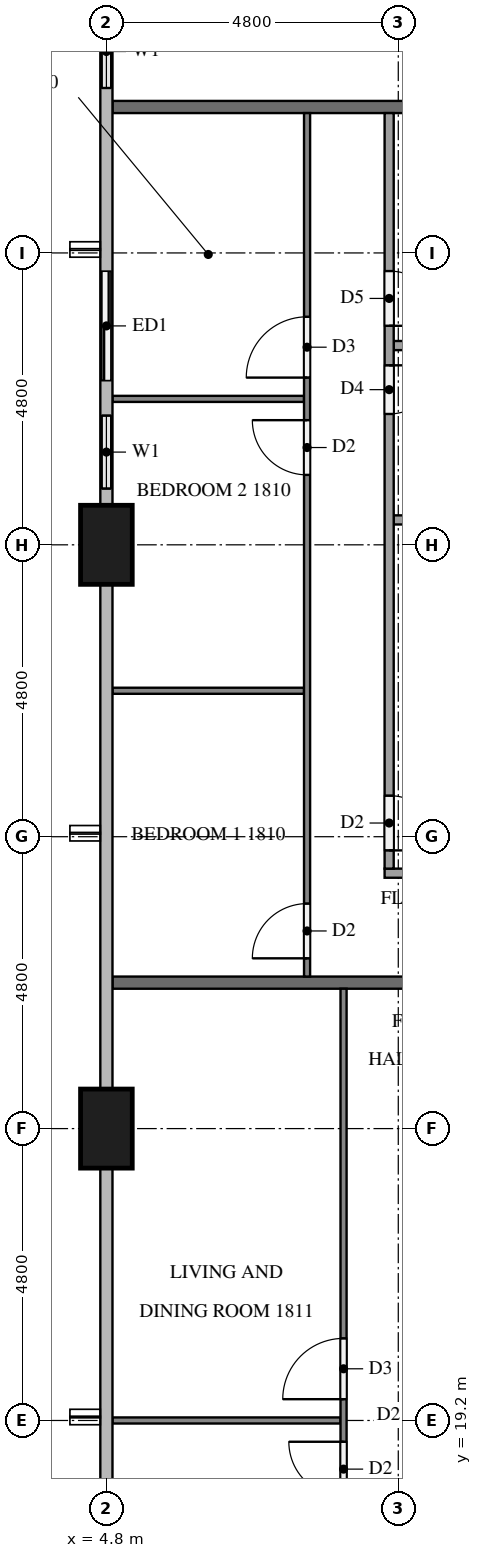
"""IFC4 building model, lengths in metres.
Left out: names, types, materials, properties, quantities, classifications, styles, units other than length and angle.
Written with IfcOpenShell. Run it as: python <this file> out.ifc"""

import sys

from ifc_helpers import new_model, si_unit, direction, frame, frame_2d, origin, origin_2d, place, context, subcontext, project, spatial, rectangle, extrude, element, fill, save


model = new_model("IFC4")
c1 = context("Model", 3, precision=1e-05, world=origin(), true_north=direction((0.0, 1.0)))
c2 = subcontext(c1, "Body", "Model", "MODEL_VIEW")
j1 = project(units=[si_unit("LENGTHUNIT", "METRE"), si_unit("PLANEANGLEUNIT", "RADIAN")], contexts=[c1])
p1 = place(None, origin())
s1 = spatial("IfcSite", under=j1, at=p1, CompositionType="ELEMENT")
p2 = place(p1, origin())
s2 = spatial("IfcBuilding", under=s1, at=p2, CompositionType="ELEMENT")
p3 = place(p2, frame((0.0, 0.0, 73.3)))
s3 = spatial("IfcBuildingStorey", under=s2, at=p3, CompositionType="ELEMENT", Elevation=73.3)
for number, where, z_axis, x_axis in (
    (1, (4.8, 33.6, 0.0), (0.0, 0.0, 1.0), (0.0, 1.0, 0.0)),
    (2, (4.8, 24.0, 0.0), (0.0, 0.0, 1.0), (0.0, 1.0, 0.0)),
):
    element("IfcColumn", number, at=place(p3, frame(where, z_axis=z_axis, x_axis=x_axis)), inside=s3, PredefinedType="COLUMN", context=c2, shape_type="SweptSolid", body=[
        extrude(rectangle(XDim=1.3, YDim=0.85, at=origin_2d()), origin(), (0.0, 0.0, 1.0), 3.2),
    ])
p4 = place(p3, frame((4.8, 42.625, 0.0), z_axis=(0.0, 0.0, 1.0), x_axis=(0.0, -1.0, 0.0)))
e3 = element("IfcWall", 3, at=p4, inside=s3, PredefinedType="SOLIDWALL", context=c2, shape_type="SweptSolid", body=[
    extrude(rectangle(XDim=1.825, YDim=0.15, at=frame_2d((0.913, 0.0))), origin(), (0.0, 0.0, 1.0), 3.2),
])
p5 = place(p4, frame((0.312, 0.0, 0.9)))
e4 = element("IfcOpeningElement", 4, at=p5, cuts=e3, PredefinedType="OPENING", context=c2, shape_type="SweptSolid", body=[
    extrude(rectangle(XDim=1.2, YDim=1.4, at=frame_2d((0.6, 0.7))), frame((0.0, 0.085, 0.0), z_axis=(0.0, -1.0, 0.0), x_axis=(1.0, 0.0, 0.0)), (0.0, 0.0, 1.0), 0.17),
])
p6 = place(p3, frame((4.8, 38.4, 0.0), z_axis=(0.0, 0.0, 1.0), x_axis=(0.0, -1.0, 0.0)))
e5 = element("IfcWall", 5, at=p6, inside=s3, PredefinedType="SOLIDWALL", context=c2, shape_type="SweptSolid", body=[
    extrude(rectangle(XDim=4.15, YDim=0.15, at=frame_2d((2.075, 0.0))), origin(), (0.0, 0.0, 1.0), 3.2),
])
p7 = place(p6, frame((0.3, 0.0, 0.0)))
e6 = element("IfcOpeningElement", 6, at=p7, cuts=e5, PredefinedType="OPENING", context=c2, shape_type="SweptSolid", body=[
    extrude(rectangle(XDim=1.8, YDim=2.4, at=frame_2d((0.9, 1.2))), frame((0.0, 0.085, 0.0), z_axis=(0.0, -1.0, 0.0), x_axis=(1.0, 0.0, 0.0)), (0.0, 0.0, 1.0), 0.17),
])
p8 = place(p6, frame((2.675, 0.0, 0.9)))
e7 = element("IfcOpeningElement", 7, at=p8, cuts=e5, PredefinedType="OPENING", context=c2, shape_type="SweptSolid", body=[
    extrude(rectangle(XDim=1.2, YDim=1.4, at=frame_2d((0.6, 0.7))), frame((0.0, 0.085, 0.0), z_axis=(0.0, -1.0, 0.0), x_axis=(1.0, 0.0, 0.0)), (0.0, 0.0, 1.0), 0.17),
])
for number, where, z_axis, x_axis in (
    (8, (4.9, 40.8, 0.0), (0.0, 0.0, 1.0), (1.0, 0.0, 0.0)),
    (9, (4.9, 26.4, 0.0), (0.0, 0.0, 1.0), (1.0, 0.0, 0.0)),
):
    element("IfcWall", number, at=place(p3, frame(where, z_axis=z_axis, x_axis=x_axis)), inside=s3, PredefinedType="PARTITIONING", context=c2, shape_type="SweptSolid", body=[
        extrude(rectangle(XDim=7.0, YDim=0.2, at=frame_2d((3.5, 0.0))), origin(), (0.0, 0.0, 1.0), 3.2),
    ])
for number, where, z_axis, x_axis in (
    (10, (8.05, 31.2, 0.0), (0.0, 0.0, 1.0), (-1.0, 0.0, 0.0)),
    (11, (8.05, 36.0, 0.0), (0.0, 0.0, 1.0), (-1.0, 0.0, 0.0)),
):
    element("IfcWall", number, at=place(p3, frame(where, z_axis=z_axis, x_axis=x_axis)), inside=s3, PredefinedType="PARTITIONING", context=c2, shape_type="SweptSolid", body=[
        extrude(rectangle(XDim=3.15, YDim=0.1, at=frame_2d((1.575, 0.0))), origin(), (0.0, 0.0, 1.0), 3.2),
    ])
p9 = place(p3, frame((8.1, 26.5, 0.0), z_axis=(0.0, 0.0, 1.0), x_axis=(0.0, 1.0, 0.0)))
e12 = element("IfcWall", 12, at=p9, inside=s3, PredefinedType="PARTITIONING", context=c2, shape_type="SweptSolid", body=[
    extrude(rectangle(XDim=14.2, YDim=0.1, at=frame_2d((7.1, 0.0))), origin(), (0.0, 0.0, 1.0), 3.2),
])
p10 = place(p9, frame((0.3, 0.0, 0.0)))
e13 = element("IfcOpeningElement", 13, at=p10, cuts=e12, PredefinedType="OPENING", context=c2, shape_type="SweptSolid", body=[
    extrude(rectangle(XDim=0.9, YDim=2.1, at=frame_2d((0.45, 1.05))), frame((0.0, 0.06, 0.0), z_axis=(0.0, -1.0, 0.0), x_axis=(1.0, 0.0, 0.0)), (0.0, 0.0, 1.0), 0.12),
])
p11 = place(p9, frame((8.25, 0.0, 0.0)))
e14 = element("IfcOpeningElement", 14, at=p11, cuts=e12, PredefinedType="OPENING", context=c2, shape_type="SweptSolid", body=[
    extrude(rectangle(XDim=0.9, YDim=2.1, at=frame_2d((0.45, 1.05))), frame((0.0, 0.06, 0.0), z_axis=(0.0, -1.0, 0.0), x_axis=(1.0, 0.0, 0.0)), (0.0, 0.0, 1.0), 0.12),
])
p12 = place(p9, frame((9.85, 0.0, 0.0)))
e15 = element("IfcOpeningElement", 15, at=p12, cuts=e12, PredefinedType="OPENING", context=c2, shape_type="SweptSolid", body=[
    extrude(rectangle(XDim=1.0, YDim=2.1, at=frame_2d((0.5, 1.05))), frame((0.0, 0.06, 0.0), z_axis=(0.0, -1.0, 0.0), x_axis=(1.0, 0.0, 0.0)), (0.0, 0.0, 1.0), 0.12),
])
for number, where, z_axis, x_axis in (
    (16, (11.9, 34.01, 0.0), (0.0, 0.0, 1.0), (-1.0, 0.0, 0.0)),
    (17, (11.9, 36.877, 0.0), (0.0, 0.0, 1.0), (-1.0, 0.0, 0.0)),
):
    element("IfcWall", number, at=place(p3, frame(where, z_axis=z_axis, x_axis=x_axis)), inside=s3, PredefinedType="PARTITIONING", context=c2, shape_type="SweptSolid", body=[
        extrude(rectangle(XDim=2.375, YDim=0.15, at=frame_2d((1.188, 0.0))), origin(), (0.0, 0.0, 1.0), 3.2),
    ])
p13 = place(p3, frame((11.9, 28.2, 0.0), z_axis=(0.0, 0.0, 1.0), x_axis=(-1.0, 0.0, 0.0)))
e18 = element("IfcWall", 18, at=p13, inside=s3, PredefinedType="PARTITIONING", context=c2, shape_type="SweptSolid", body=[
    extrude(rectangle(XDim=2.525, YDim=0.15, at=frame_2d((1.262, 0.0))), origin(), (0.0, 0.0, 1.0), 3.2),
])
p14 = place(p3, frame((9.45, 40.7, 0.0), z_axis=(0.0, 0.0, 1.0), x_axis=(0.0, -1.0, 0.0)))
e19 = element("IfcWall", 19, at=p14, inside=s3, PredefinedType="PARTITIONING", context=c2, shape_type="SweptSolid", body=[
    extrude(rectangle(XDim=12.425, YDim=0.15, at=frame_2d((6.212, 0.0))), origin(), (0.0, 0.0, 1.0), 3.2),
])
p15 = place(p14, frame((11.225, 0.0, 0.0)))
e20 = element("IfcOpeningElement", 20, at=p15, cuts=e19, PredefinedType="OPENING", context=c2, shape_type="SweptSolid", body=[
    extrude(rectangle(XDim=0.9, YDim=2.1, at=frame_2d((0.45, 1.05))), frame((0.0, 0.085, 0.0), z_axis=(0.0, -1.0, 0.0), x_axis=(1.0, 0.0, 0.0)), (0.0, 0.0, 1.0), 0.17),
])
p16 = place(p14, frame((4.148, 0.0, 0.0)))
e21 = element("IfcOpeningElement", 21, at=p16, cuts=e19, PredefinedType="OPENING", context=c2, shape_type="SweptSolid", body=[
    extrude(rectangle(XDim=0.8, YDim=2.1, at=frame_2d((0.4, 1.05))), frame((0.0, 0.085, 0.0), z_axis=(0.0, -1.0, 0.0), x_axis=(1.0, 0.0, 0.0)), (0.0, 0.0, 1.0), 0.17),
])
p17 = place(p14, frame((2.598, 0.0, 0.0)))
e22 = element("IfcOpeningElement", 22, at=p17, cuts=e19, PredefinedType="OPENING", context=c2, shape_type="SweptSolid", body=[
    extrude(rectangle(XDim=0.9, YDim=2.1, at=frame_2d((0.45, 1.05))), frame((0.0, 0.085, 0.0), z_axis=(0.0, -1.0, 0.0), x_axis=(1.0, 0.0, 0.0)), (0.0, 0.0, 1.0), 0.17),
])
p18 = place(p3, frame((8.65, 19.2, 0.0), z_axis=(0.0, 0.0, 1.0), x_axis=(-1.0, 0.0, 0.0)))
e23 = element("IfcWall", 23, at=p18, inside=s3, PredefinedType="PARTITIONING", context=c2, shape_type="SweptSolid", body=[
    extrude(rectangle(XDim=3.75, YDim=0.1, at=frame_2d((1.875, 0.0))), origin(), (0.0, 0.0, 1.0), 3.2),
])
p19 = place(p3, frame((8.7, 14.5, 0.0), z_axis=(0.0, 0.0, 1.0), x_axis=(0.0, 1.0, 0.0)))
e24 = element("IfcWall", 24, at=p19, inside=s3, PredefinedType="PARTITIONING", context=c2, shape_type="SweptSolid", body=[
    extrude(rectangle(XDim=11.8, YDim=0.1, at=frame_2d((5.9, 0.0))), origin(), (0.0, 0.0, 1.0), 3.2),
])
p20 = place(p19, frame((5.05, 0.0, 0.0)))
e25 = element("IfcOpeningElement", 25, at=p20, cuts=e24, PredefinedType="OPENING", context=c2, shape_type="SweptSolid", body=[
    extrude(rectangle(XDim=1.0, YDim=2.1, at=frame_2d((0.5, 1.05))), frame((0.0, 0.06, 0.0), z_axis=(0.0, -1.0, 0.0), x_axis=(1.0, 0.0, 0.0)), (0.0, 0.0, 1.0), 0.12),
])
p21 = place(p19, frame((3.45, 0.0, 0.0)))
e26 = element("IfcOpeningElement", 26, at=p21, cuts=e24, PredefinedType="OPENING", context=c2, shape_type="SweptSolid", body=[
    extrude(rectangle(XDim=0.9, YDim=2.1, at=frame_2d((0.45, 1.05))), frame((0.0, 0.06, 0.0), z_axis=(0.0, -1.0, 0.0), x_axis=(1.0, 0.0, 0.0)), (0.0, 0.0, 1.0), 0.12),
])
p22 = place(p5, origin())
e27 = element("IfcWindow", 27, at=p22, inside=s3, PartitioningType="SINGLE_PANEL", PredefinedType="WINDOW", context=c2, shape_type="SweptSolid", body=[
    extrude(rectangle(XDim=1.2, YDim=1.4, at=frame_2d((0.6, 0.7))), frame((0.0, 0.03, 0.0), z_axis=(0.0, -1.0, 0.0), x_axis=(1.0, 0.0, 0.0)), (0.0, 0.0, 1.0), 0.06),
])
fill(e4, e27)
p23 = place(p7, origin())
e28 = element("IfcDoor", 28, at=p23, inside=s3, OperationType="SLIDING_TO_RIGHT", PredefinedType="DOOR", context=c2, shape_type="SweptSolid", body=[
    extrude(rectangle(XDim=1.8, YDim=2.4, at=frame_2d((0.9, 1.2))), frame((0.0, 0.025, 0.0), z_axis=(0.0, -1.0, 0.0), x_axis=(1.0, 0.0, 0.0)), (0.0, 0.0, 1.0), 0.05),
])
fill(e6, e28)
p24 = place(p8, origin())
e29 = element("IfcWindow", 29, at=p24, inside=s3, PartitioningType="SINGLE_PANEL", PredefinedType="WINDOW", context=c2, shape_type="SweptSolid", body=[
    extrude(rectangle(XDim=1.2, YDim=1.4, at=frame_2d((0.6, 0.7))), frame((0.0, 0.03, 0.0), z_axis=(0.0, -1.0, 0.0), x_axis=(1.0, 0.0, 0.0)), (0.0, 0.0, 1.0), 0.06),
])
fill(e7, e29)
p25 = place(p10, origin())
e30 = element("IfcDoor", 30, at=p25, inside=s3, OperationType="SINGLE_SWING_LEFT", PredefinedType="DOOR", context=c2, shape_type="SweptSolid", body=[
    extrude(rectangle(XDim=0.9, YDim=2.1, at=frame_2d((0.45, 1.05))), frame((0.0, 0.025, 0.0), z_axis=(0.0, -1.0, 0.0), x_axis=(1.0, 0.0, 0.0)), (0.0, 0.0, 1.0), 0.05),
])
fill(e13, e30)
p26 = place(p11, origin())
e31 = element("IfcDoor", 31, at=p26, inside=s3, OperationType="SINGLE_SWING_RIGHT", PredefinedType="DOOR", context=c2, shape_type="SweptSolid", body=[
    extrude(rectangle(XDim=0.9, YDim=2.1, at=frame_2d((0.45, 1.05))), frame((0.0, 0.025, 0.0), z_axis=(0.0, -1.0, 0.0), x_axis=(1.0, 0.0, 0.0)), (0.0, 0.0, 1.0), 0.05),
])
fill(e14, e31)
p27 = place(p12, origin())
e32 = element("IfcDoor", 32, at=p27, inside=s3, OperationType="SINGLE_SWING_LEFT", PredefinedType="DOOR", context=c2, shape_type="SweptSolid", body=[
    extrude(rectangle(XDim=1.0, YDim=2.1, at=frame_2d((0.5, 1.05))), frame((0.0, 0.025, 0.0), z_axis=(0.0, -1.0, 0.0), x_axis=(1.0, 0.0, 0.0)), (0.0, 0.0, 1.0), 0.05),
])
fill(e15, e32)
p28 = place(p15, origin())
e33 = element("IfcDoor", 33, at=p28, inside=s3, OperationType="SINGLE_SWING_RIGHT", PredefinedType="DOOR", context=c2, shape_type="SweptSolid", body=[
    extrude(rectangle(XDim=0.9, YDim=2.1, at=frame_2d((0.45, 1.05))), frame((0.0, 0.025, 0.0), z_axis=(0.0, -1.0, 0.0), x_axis=(1.0, 0.0, 0.0)), (0.0, 0.0, 1.0), 0.05),
])
fill(e20, e33)
p29 = place(p16, origin())
e34 = element("IfcDoor", 34, at=p29, inside=s3, OperationType="SINGLE_SWING_LEFT", PredefinedType="DOOR", context=c2, shape_type="SweptSolid", body=[
    extrude(rectangle(XDim=0.8, YDim=2.1, at=frame_2d((0.4, 1.05))), frame((0.0, 0.025, 0.0), z_axis=(0.0, -1.0, 0.0), x_axis=(1.0, 0.0, 0.0)), (0.0, 0.0, 1.0), 0.05),
])
fill(e21, e34)
p30 = place(p17, origin())
e35 = element("IfcDoor", 35, at=p30, inside=s3, OperationType="SINGLE_SWING_RIGHT", PredefinedType="DOOR", context=c2, shape_type="SweptSolid", body=[
    extrude(rectangle(XDim=0.9, YDim=2.1, at=frame_2d((0.45, 1.05))), frame((0.0, 0.025, 0.0), z_axis=(0.0, -1.0, 0.0), x_axis=(1.0, 0.0, 0.0)), (0.0, 0.0, 1.0), 0.05),
])
fill(e22, e35)
p31 = place(p20, origin())
e36 = element("IfcDoor", 36, at=p31, inside=s3, OperationType="SINGLE_SWING_LEFT", PredefinedType="DOOR", context=c2, shape_type="SweptSolid", body=[
    extrude(rectangle(XDim=1.0, YDim=2.1, at=frame_2d((0.5, 1.05))), frame((0.0, 0.025, 0.0), z_axis=(0.0, -1.0, 0.0), x_axis=(1.0, 0.0, 0.0)), (0.0, 0.0, 1.0), 0.05),
])
fill(e25, e36)
p32 = place(p21, origin())
e37 = element("IfcDoor", 37, at=p32, inside=s3, OperationType="SINGLE_SWING_RIGHT", PredefinedType="DOOR", context=c2, shape_type="SweptSolid", body=[
    extrude(rectangle(XDim=0.9, YDim=2.1, at=frame_2d((0.45, 1.05))), frame((0.0, 0.025, 0.0), z_axis=(0.0, -1.0, 0.0), x_axis=(1.0, 0.0, 0.0)), (0.0, 0.0, 1.0), 0.05),
])
fill(e26, e37)
save(model, sys.argv[1])
